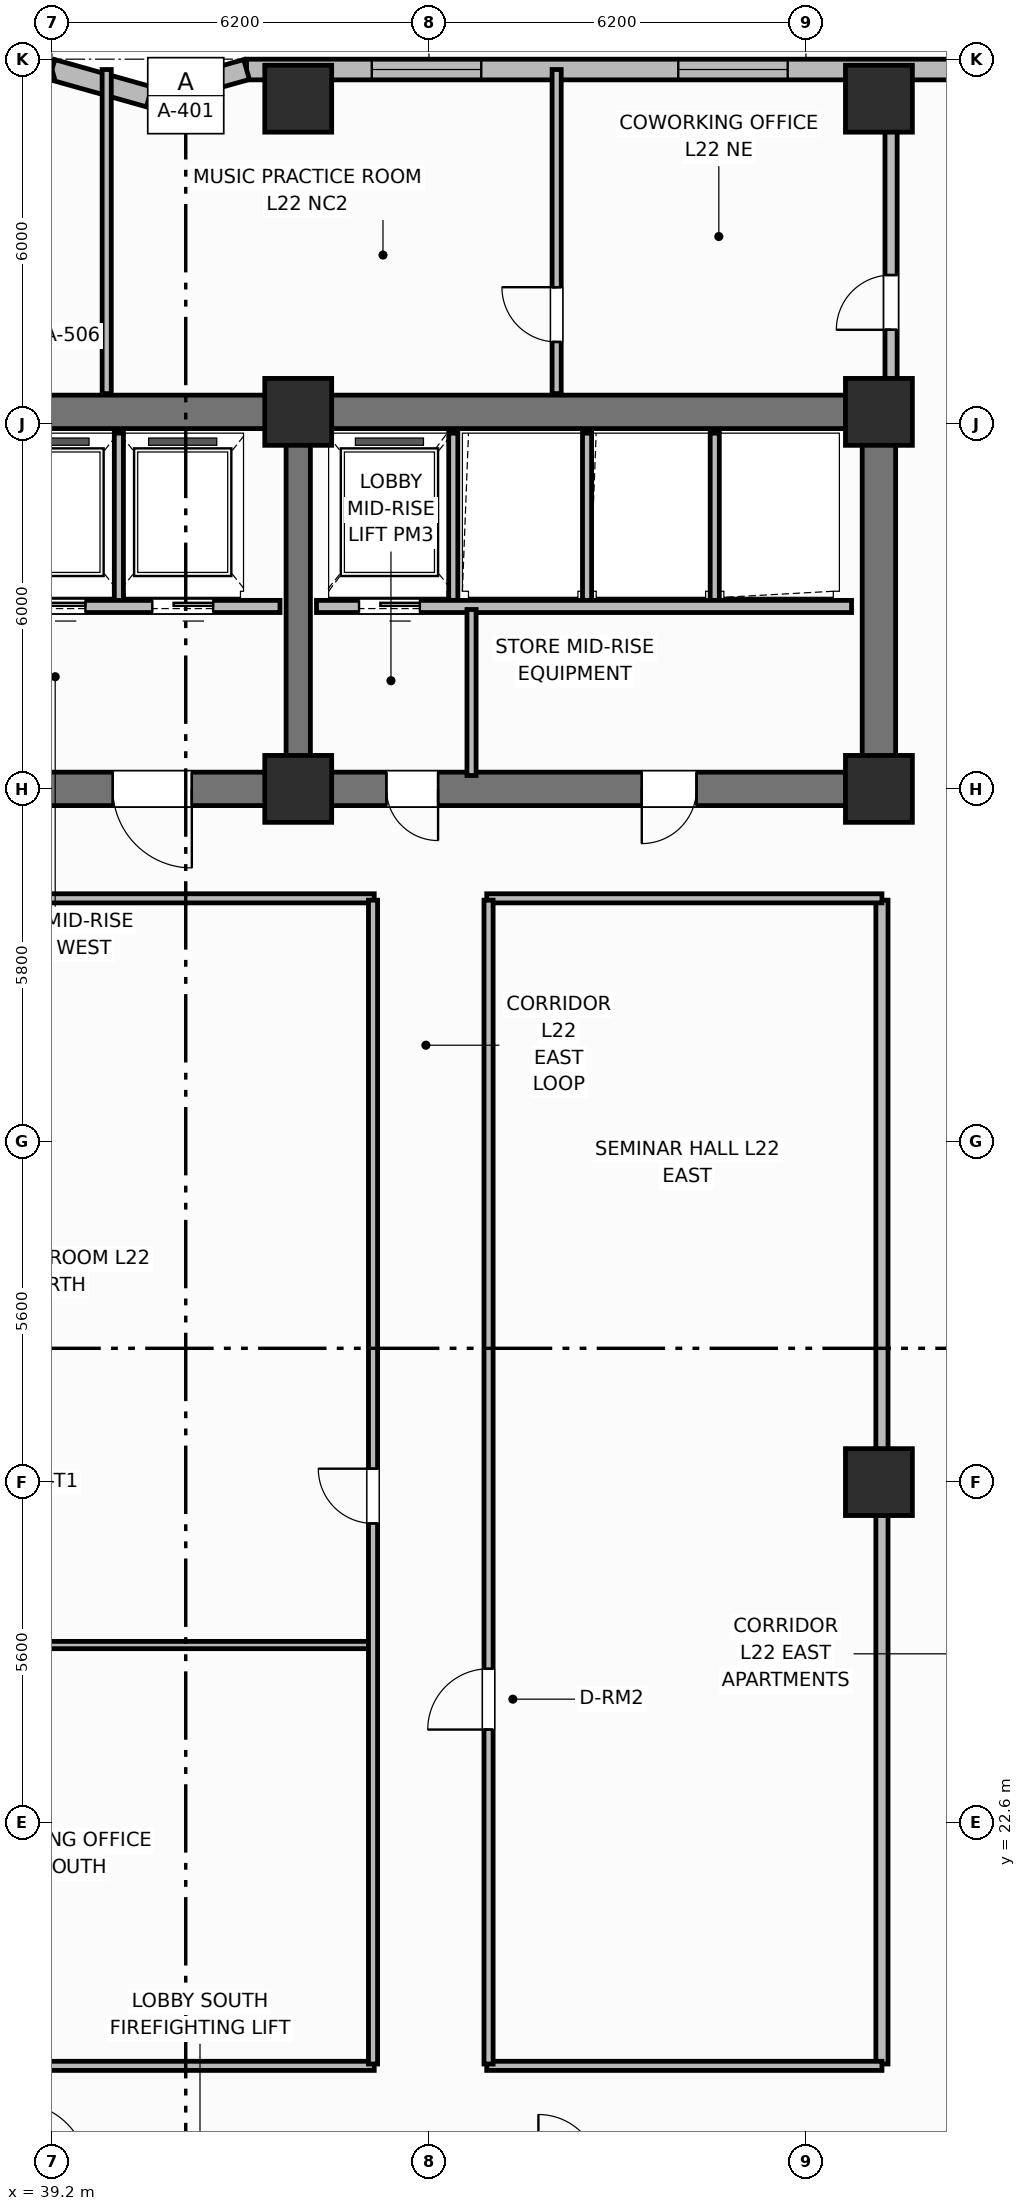
"""IFC4 building model, lengths in metres.
Left out: names, types, materials, properties, quantities, classifications, styles, units other than length and angle.
Written with IfcOpenShell. Run it as: python <this file> out.ifc"""

import sys

from ifc_helpers import new_model, si_unit, direction, frame, frame_2d, origin, origin_2d, place, context, subcontext, project, spatial, rectangle, extrude, element, fill, save


model = new_model("IFC4")
c1 = context("Model", 3, precision=1e-05, world=origin(), true_north=direction((0.0, 1.0)))
c2 = subcontext(c1, "Body", "Model", "MODEL_VIEW")
j1 = project(units=[si_unit("LENGTHUNIT", "METRE"), si_unit("PLANEANGLEUNIT", "RADIAN")], contexts=[c1])
p1 = place(None, origin())
s1 = spatial("IfcSite", under=j1, at=p1, CompositionType="ELEMENT")
p2 = place(p1, origin())
s2 = spatial("IfcBuilding", under=s1, at=p2, CompositionType="ELEMENT")
p3 = place(p2, frame((0.0, 0.0, 92.0)))
s3 = spatial("IfcBuildingStorey", under=s2, at=p3, CompositionType="ELEMENT", Elevation=92.0)
p4 = place(p3, frame((25.6, 45.8, 0.0), z_axis=(0.0, 0.0, 1.0), x_axis=(1.0, 0.0, 0.0)))
e1 = element("IfcWall", 1, at=p4, inside=s3, PredefinedType="SHEAR", context=c2, shape_type="SweptSolid", body=[
    extrude(rectangle(XDim=27.2, YDim=0.55, at=frame_2d((13.6, 0.0))), origin(), (0.0, 0.0, 1.0), 3.7),
])
p5 = place(p3, frame((52.8, 39.875, 0.0), z_axis=(0.0, 0.0, 1.0), x_axis=(0.0, 1.0, 0.0)))
e2 = element("IfcWall", 2, at=p5, inside=s3, PredefinedType="SHEAR", context=c2, shape_type="SweptSolid", body=[
    extrude(rectangle(XDim=5.65, YDim=0.55, at=frame_2d((2.825, 0.0))), origin(), (0.0, 0.0, 1.0), 3.7),
])
p6 = place(p3, frame((52.8, 39.6, 0.0), z_axis=(0.0, 0.0, 1.0), x_axis=(-1.0, 0.0, 0.0)))
e3 = element("IfcWall", 3, at=p6, inside=s3, PredefinedType="SHEAR", context=c2, shape_type="SweptSolid", body=[
    extrude(rectangle(XDim=27.2, YDim=0.55, at=frame_2d((13.6, 0.0))), origin(), (0.0, 0.0, 1.0), 3.7),
])
p7 = place(p6, frame((24.2, 0.0, 0.0)))
e4 = element("IfcOpeningElement", 4, at=p7, cuts=e3, PredefinedType="OPENING", context=c2, shape_type="SweptSolid", body=[
    extrude(rectangle(XDim=1.1, YDim=2.15, at=frame_2d((0.55, 1.075))), frame((0.0, 0.285, 0.0), z_axis=(0.0, -1.0, 0.0), x_axis=(1.0, 0.0, 0.0)), (0.0, 0.0, 1.0), 0.57),
])
p8 = place(p6, frame((15.1, 0.0, 0.0)))
e5 = element("IfcOpeningElement", 5, at=p8, cuts=e3, PredefinedType="OPENING", context=c2, shape_type="SweptSolid", body=[
    extrude(rectangle(XDim=1.2, YDim=2.15, at=frame_2d((0.6, 1.075))), frame((0.0, 0.285, 0.0), z_axis=(0.0, -1.0, 0.0), x_axis=(1.0, 0.0, 0.0)), (0.0, 0.0, 1.0), 0.57),
])
p9 = place(p6, frame((11.3, 0.0, 0.0)))
e6 = element("IfcOpeningElement", 6, at=p9, cuts=e3, PredefinedType="OPENING", context=c2, shape_type="SweptSolid", body=[
    extrude(rectangle(XDim=1.3, YDim=2.2, at=frame_2d((0.65, 1.1))), frame((0.0, 0.285, 0.0), z_axis=(0.0, -1.0, 0.0), x_axis=(1.0, 0.0, 0.0)), (0.0, 0.0, 1.0), 0.57),
])
p10 = place(p6, frame((7.25, 0.0, 0.0)))
e7 = element("IfcOpeningElement", 7, at=p10, cuts=e3, PredefinedType="OPENING", context=c2, shape_type="SweptSolid", body=[
    extrude(rectangle(XDim=0.85, YDim=2.1, at=frame_2d((0.425, 1.05))), frame((0.0, 0.285, 0.0), z_axis=(0.0, -1.0, 0.0), x_axis=(1.0, 0.0, 0.0)), (0.0, 0.0, 1.0), 0.57),
])
p11 = place(p6, frame((3.0, 0.0, 0.0)))
e8 = element("IfcOpeningElement", 8, at=p11, cuts=e3, PredefinedType="OPENING", context=c2, shape_type="SweptSolid", body=[
    extrude(rectangle(XDim=0.9, YDim=2.1, at=frame_2d((0.45, 1.05))), frame((0.0, 0.285, 0.0), z_axis=(0.0, -1.0, 0.0), x_axis=(1.0, 0.0, 0.0)), (0.0, 0.0, 1.0), 0.57),
])
p12 = place(p3, frame((43.25, 39.875, 0.0), z_axis=(0.0, 0.0, 1.0), x_axis=(0.0, 1.0, 0.0)))
e9 = element("IfcWall", 9, at=p12, inside=s3, PredefinedType="SHEAR", context=c2, shape_type="SweptSolid", body=[
    extrude(rectangle(XDim=5.65, YDim=0.4, at=frame_2d((2.825, 0.0))), origin(), (0.0, 0.0, 1.0), 3.7),
])
for number, where, z_axis, x_axis in (
    (10, (43.25, 39.6, 0.0), (0.0, 0.0, 1.0), (1.0, 0.0, 0.0)),
    (11, (43.25, 45.8, 0.0), (0.0, 0.0, 1.0), (1.0, 0.0, 0.0)),
    (12, (52.8, 39.6, 0.0), (0.0, 0.0, 1.0), (1.0, 0.0, 0.0)),
    (13, (52.8, 45.8, 0.0), (0.0, 0.0, 1.0), (1.0, 0.0, 0.0)),
    (14, (52.8, 28.2, 0.0), (0.0, 0.0, 1.0), (1.0, 0.0, 0.0)),
    (15, (43.25, 50.95, 0.0), (0.0, 0.0, 1.0), (1.0, 0.0, 0.0)),
    (16, (52.8, 50.95, 0.0), (0.0, 0.0, 1.0), (1.0, 0.0, 0.0)),
):
    element("IfcColumn", number, at=place(p3, frame(where, z_axis=z_axis, x_axis=x_axis)), inside=s3, PredefinedType="COLUMN", context=c2, shape_type="SweptSolid", body=[
        extrude(rectangle(XDim=1.1, YDim=1.1, at=origin_2d()), origin(), (0.0, 0.0, 1.0), 3.7),
    ])
p13 = place(p3, frame((59.8, 51.43, 0.0), z_axis=(0.0, 0.0, 1.0), x_axis=(-1.0, 0.0, 0.0)))
e17 = element("IfcWall", 17, at=p13, inside=s3, PredefinedType="SOLIDWALL", context=c2, shape_type="SweptSolid", body=[
    extrude(rectangle(XDim=17.4, YDim=0.34, at=frame_2d((8.7, 0.0))), origin(), (0.0, 0.0, 1.0), 2.7),
])
p14 = place(p13, frame((1.36, 0.0, 0.73)))
e18 = element("IfcOpeningElement", 18, at=p14, cuts=e17, PredefinedType="OPENING", context=c2, shape_type="SweptSolid", body=[
    extrude(rectangle(XDim=1.8, YDim=1.85, at=frame_2d((0.9, 0.925))), frame((0.0, 0.18, 0.0), z_axis=(0.0, -1.0, 0.0), x_axis=(1.0, 0.0, 0.0)), (0.0, 0.0, 1.0), 0.36),
])
p15 = place(p13, frame((8.5, 0.0, 0.73)))
e19 = element("IfcOpeningElement", 19, at=p15, cuts=e17, PredefinedType="OPENING", context=c2, shape_type="SweptSolid", body=[
    extrude(rectangle(XDim=1.8, YDim=1.85, at=frame_2d((0.9, 0.925))), frame((0.0, 0.18, 0.0), z_axis=(0.0, -1.0, 0.0), x_axis=(1.0, 0.0, 0.0)), (0.0, 0.0, 1.0), 0.36),
])
p16 = place(p13, frame((13.54, 0.0, 0.73)))
e20 = element("IfcOpeningElement", 20, at=p16, cuts=e17, PredefinedType="OPENING", context=c2, shape_type="SweptSolid", body=[
    extrude(rectangle(XDim=1.8, YDim=1.85, at=frame_2d((0.9, 0.925))), frame((0.0, 0.18, 0.0), z_axis=(0.0, -1.0, 0.0), x_axis=(1.0, 0.0, 0.0)), (0.0, 0.0, 1.0), 0.36),
])
p17 = place(p3, frame((42.4, 51.43, 0.0), z_axis=(0.0, 0.0, 1.0), x_axis=(-0.962652136636, -0.270741322725, 0.0)))
e21 = element("IfcWall", 21, at=p17, inside=s3, PredefinedType="SOLIDWALL", context=c2, shape_type="SweptSolid", body=[
    extrude(rectangle(XDim=1.662, YDim=0.34, at=frame_2d((0.831, 0.0))), origin(), (0.0, 0.0, 1.0), 2.7),
])
p18 = place(p3, frame((40.8, 50.98, 0.0), z_axis=(0.0, 0.0, 1.0), x_axis=(-0.962662902433, 0.270703040766, 0.0)))
e22 = element("IfcWall", 22, at=p18, inside=s3, PredefinedType="SOLIDWALL", context=c2, shape_type="SweptSolid", body=[
    extrude(rectangle(XDim=1.662, YDim=0.34, at=frame_2d((0.831, 0.0))), origin(), (0.0, 0.0, 1.0), 2.7),
])
p19 = place(p3, frame((39.2, 51.43, 0.0), z_axis=(0.0, 0.0, 1.0), x_axis=(-0.962652136636, -0.270741322725, 0.0)))
e23 = element("IfcWall", 23, at=p19, inside=s3, PredefinedType="SOLIDWALL", context=c2, shape_type="SweptSolid", body=[
    extrude(rectangle(XDim=1.662, YDim=0.34, at=frame_2d((0.831, 0.0))), origin(), (0.0, 0.0, 1.0), 2.7),
])
p20 = place(p3, frame((40.3, 42.65, 0.0), z_axis=(0.0, 0.0, 1.0), x_axis=(0.0, 1.0, 0.0)))
e24 = element("IfcWall", 24, at=p20, inside=s3, PredefinedType="PARTITIONING", context=c2, shape_type="SweptSolid", body=[
    extrude(rectangle(XDim=2.8, YDim=0.15, at=frame_2d((1.4, 0.0))), origin(), (0.0, 0.0, 1.0), 2.53),
])
p21 = place(p3, frame((42.95, 42.6, 0.0), z_axis=(0.0, 0.0, 1.0), x_axis=(-1.0, 0.0, 0.0)))
e25 = element("IfcWall", 25, at=p21, inside=s3, PredefinedType="PARTITIONING", context=c2, shape_type="SweptSolid", body=[
    extrude(rectangle(XDim=4.6, YDim=0.2, at=frame_2d((2.3, 0.0))), origin(), (0.0, 0.0, 1.0), 2.3),
])
p22 = place(p21, frame((3.2, 0.0, 0.0)))
e26 = element("IfcOpeningElement", 26, at=p22, cuts=e25, PredefinedType="OPENING", context=c2, shape_type="SweptSolid", body=[
    extrude(rectangle(XDim=1.0, YDim=2.15, at=frame_2d((0.5, 1.075))), frame((0.0, 0.11, 0.0), z_axis=(0.0, -1.0, 0.0), x_axis=(1.0, 0.0, 0.0)), (0.0, 0.0, 1.0), 0.22),
])
p23 = place(p21, frame((1.1, 0.0, 0.0)))
e27 = element("IfcOpeningElement", 27, at=p23, cuts=e25, PredefinedType="OPENING", context=c2, shape_type="SweptSolid", body=[
    extrude(rectangle(XDim=1.0, YDim=2.15, at=frame_2d((0.5, 1.075))), frame((0.0, 0.11, 0.0), z_axis=(0.0, -1.0, 0.0), x_axis=(1.0, 0.0, 0.0)), (0.0, 0.0, 1.0), 0.22),
])
for number, where, z_axis, x_axis in (
    (28, (45.8, 42.65, 0.0), (0.0, 0.0, 1.0), (0.0, 1.0, 0.0)),
    (29, (48.0, 42.65, 0.0), (0.0, 0.0, 1.0), (0.0, 1.0, 0.0)),
    (30, (50.1, 42.65, 0.0), (0.0, 0.0, 1.0), (0.0, 1.0, 0.0)),
):
    element("IfcWall", number, at=place(p3, frame(where, z_axis=z_axis, x_axis=x_axis)), inside=s3, PredefinedType="PARTITIONING", context=c2, shape_type="SweptSolid", body=[
        extrude(rectangle(XDim=2.8, YDim=0.15, at=frame_2d((1.4, 0.0))), origin(), (0.0, 0.0, 1.0), 2.53),
    ])
p24 = place(p3, frame((52.35, 42.6, 0.0), z_axis=(0.0, 0.0, 1.0), x_axis=(-1.0, 0.0, 0.0)))
e31 = element("IfcWall", 31, at=p24, inside=s3, PredefinedType="PARTITIONING", context=c2, shape_type="SweptSolid", body=[
    extrude(rectangle(XDim=8.8, YDim=0.2, at=frame_2d((4.4, 0.0))), origin(), (0.0, 0.0, 1.0), 2.53),
])
p25 = place(p24, frame((7.1, 0.0, 0.0)))
e32 = element("IfcOpeningElement", 32, at=p25, cuts=e31, PredefinedType="OPENING", context=c2, shape_type="SweptSolid", body=[
    extrude(rectangle(XDim=1.0, YDim=2.15, at=frame_2d((0.5, 1.075))), frame((0.0, 0.11, 0.0), z_axis=(0.0, -1.0, 0.0), x_axis=(1.0, 0.0, 0.0)), (0.0, 0.0, 1.0), 0.22),
])
p26 = place(p3, frame((46.1, 39.82, 0.0), z_axis=(0.0, 0.0, 1.0), x_axis=(0.0, 1.0, 0.0)))
e33 = element("IfcWall", 33, at=p26, inside=s3, PredefinedType="PARTITIONING", context=c2, shape_type="SweptSolid", body=[
    extrude(rectangle(XDim=2.73, YDim=0.15, at=frame_2d((1.365, 0.0))), origin(), (0.0, 0.0, 1.0), 2.53),
])
p27 = place(p3, frame((52.85, 18.63, 0.0), z_axis=(0.0, 0.0, 1.0), x_axis=(0.0, 1.0, 0.0)))
e34 = element("IfcWall", 34, at=p27, inside=s3, PredefinedType="PARTITIONING", context=c2, shape_type="SweptSolid", body=[
    extrude(rectangle(XDim=19.14, YDim=0.2, at=frame_2d((9.57, 0.0))), origin(), (0.0, 0.0, 1.0), 2.53),
])
for number, where, z_axis, x_axis in (
    (35, (33.9, 18.6, 0.0), (0.0, 0.0, 1.0), (1.0, 0.0, 0.0)),
    (36, (33.9, 37.8, 0.0), (0.0, 0.0, 1.0), (1.0, 0.0, 0.0)),
):
    element("IfcWall", number, at=place(p3, frame(where, z_axis=z_axis, x_axis=x_axis)), inside=s3, PredefinedType="PARTITIONING", context=c2, shape_type="SweptSolid", body=[
        extrude(rectangle(XDim=10.6, YDim=0.15, at=frame_2d((5.3, 0.0))), origin(), (0.0, 0.0, 1.0), 2.53),
    ])
for number, where, z_axis, x_axis in (
    (37, (46.35, 18.6, 0.0), (0.0, 0.0, 1.0), (1.0, 0.0, 0.0)),
    (38, (46.35, 37.8, 0.0), (0.0, 0.0, 1.0), (1.0, 0.0, 0.0)),
):
    element("IfcWall", number, at=place(p3, frame(where, z_axis=z_axis, x_axis=x_axis)), inside=s3, PredefinedType="PARTITIONING", context=c2, shape_type="SweptSolid", body=[
        extrude(rectangle(XDim=6.5, YDim=0.15, at=frame_2d((3.25, 0.0))), origin(), (0.0, 0.0, 1.0), 2.53),
    ])
p28 = place(p3, frame((33.92, 25.521, 0.0), z_axis=(0.0, 0.0, 1.0), x_axis=(1.0, 0.0, 0.0)))
e39 = element("IfcWall", 39, at=p28, inside=s3, PredefinedType="PARTITIONING", context=c2, shape_type="SweptSolid", body=[
    extrude(rectangle(XDim=10.56, YDim=0.12, at=frame_2d((5.28, 0.0))), origin(), (0.0, 0.0, 1.0), 2.53),
])
p29 = place(p3, frame((44.48, 18.63, 0.0), z_axis=(0.0, 0.0, 1.0), x_axis=(0.0, 1.0, 0.0)))
e40 = element("IfcWall", 40, at=p29, inside=s3, PredefinedType="PARTITIONING", context=c2, shape_type="SweptSolid", body=[
    extrude(rectangle(XDim=19.14, YDim=0.15, at=frame_2d((9.57, 0.0))), origin(), (0.0, 0.0, 1.0), 2.53),
])
p30 = place(p29, frame((8.89, 0.0, 0.0)))
e41 = element("IfcOpeningElement", 41, at=p30, cuts=e40, PredefinedType="OPENING", context=c2, shape_type="SweptSolid", body=[
    extrude(rectangle(XDim=0.9, YDim=2.1, at=frame_2d((0.45, 1.05))), frame((0.0, 0.085, 0.0), z_axis=(0.0, -1.0, 0.0), x_axis=(1.0, 0.0, 0.0)), (0.0, 0.0, 1.0), 0.17),
])
p31 = place(p3, frame((46.38, 18.63, 0.0), z_axis=(0.0, 0.0, 1.0), x_axis=(0.0, 1.0, 0.0)))
e42 = element("IfcWall", 42, at=p31, inside=s3, PredefinedType="PARTITIONING", context=c2, shape_type="SweptSolid", body=[
    extrude(rectangle(XDim=19.14, YDim=0.15, at=frame_2d((9.57, 0.0))), origin(), (0.0, 0.0, 1.0), 2.53),
])
p32 = place(p31, frame((5.5, 0.0, 0.0)))
e43 = element("IfcOpeningElement", 43, at=p32, cuts=e42, PredefinedType="OPENING", context=c2, shape_type="SweptSolid", body=[
    extrude(rectangle(XDim=1.0, YDim=2.15, at=frame_2d((0.5, 1.075))), frame((0.0, 0.085, 0.0), z_axis=(0.0, -1.0, 0.0), x_axis=(1.0, 0.0, 0.0)), (0.0, 0.0, 1.0), 0.17),
])
p33 = place(p3, frame((40.1, 46.1, 0.0), z_axis=(0.0, 0.0, 1.0), x_axis=(0.0, 1.0, 0.0)))
e44 = element("IfcWall", 44, at=p33, inside=s3, PredefinedType="PARTITIONING", context=c2, shape_type="SweptSolid", body=[
    extrude(rectangle(XDim=5.33, YDim=0.15, at=frame_2d((2.665, 0.0))), origin(), (0.0, 0.0, 1.0), 2.53),
])
p34 = place(p3, frame((47.5, 46.1, 0.0), z_axis=(0.0, 0.0, 1.0), x_axis=(0.0, 1.0, 0.0)))
e45 = element("IfcWall", 45, at=p34, inside=s3, PredefinedType="PARTITIONING", context=c2, shape_type="SweptSolid", body=[
    extrude(rectangle(XDim=5.33, YDim=0.15, at=frame_2d((2.665, 0.0))), origin(), (0.0, 0.0, 1.0), 2.53),
])
p35 = place(p34, frame((0.85, 0.0, 0.0)))
e46 = element("IfcOpeningElement", 46, at=p35, cuts=e45, PredefinedType="OPENING", context=c2, shape_type="SweptSolid", body=[
    extrude(rectangle(XDim=0.9, YDim=2.1, at=frame_2d((0.45, 1.05))), frame((0.0, 0.085, 0.0), z_axis=(0.0, -1.0, 0.0), x_axis=(1.0, 0.0, 0.0)), (0.0, 0.0, 1.0), 0.17),
])
p36 = place(p3, frame((53.0, 46.1, 0.0), z_axis=(0.0, 0.0, 1.0), x_axis=(0.0, 1.0, 0.0)))
e47 = element("IfcWall", 47, at=p36, inside=s3, PredefinedType="PARTITIONING", context=c2, shape_type="SweptSolid", body=[
    extrude(rectangle(XDim=4.68, YDim=0.2, at=frame_2d((2.34, 0.0))), origin(), (0.0, 0.0, 1.0), 2.53),
])
p37 = place(p36, frame((1.05, 0.0, 0.0)))
e48 = element("IfcOpeningElement", 48, at=p37, cuts=e47, PredefinedType="OPENING", context=c2, shape_type="SweptSolid", body=[
    extrude(rectangle(XDim=0.9, YDim=2.1, at=frame_2d((0.45, 1.05))), frame((0.0, 0.11, 0.0), z_axis=(0.0, -1.0, 0.0), x_axis=(1.0, 0.0, 0.0)), (0.0, 0.0, 1.0), 0.22),
])
p38 = place(p15, origin())
e49 = element("IfcWindow", 49, at=p38, inside=s3, PartitioningType="SINGLE_PANEL", PredefinedType="WINDOW", context=c2, shape_type="SweptSolid", body=[
    extrude(rectangle(XDim=1.8, YDim=1.85, at=frame_2d((0.9, 0.925))), frame((0.0, 0.03, 0.0), z_axis=(0.0, -1.0, 0.0), x_axis=(1.0, 0.0, 0.0)), (0.0, 0.0, 1.0), 0.06),
])
fill(e19, e49)
p39 = place(p16, origin())
e50 = element("IfcWindow", 50, at=p39, inside=s3, PartitioningType="SINGLE_PANEL", PredefinedType="WINDOW", context=c2, shape_type="SweptSolid", body=[
    extrude(rectangle(XDim=1.8, YDim=1.85, at=frame_2d((0.9, 0.925))), frame((0.0, 0.03, 0.0), z_axis=(0.0, -1.0, 0.0), x_axis=(1.0, 0.0, 0.0)), (0.0, 0.0, 1.0), 0.06),
])
fill(e20, e50)
p40 = place(p22, origin())
e51 = element("IfcDoor", 51, at=p40, inside=s3, OperationType="SLIDING_TO_LEFT", PredefinedType="DOOR", context=c2, shape_type="SweptSolid", body=[
    extrude(rectangle(XDim=1.0, YDim=2.15, at=frame_2d((0.5, 1.075))), frame((0.0, 0.025, 0.0), z_axis=(0.0, -1.0, 0.0), x_axis=(1.0, 0.0, 0.0)), (0.0, 0.0, 1.0), 0.05),
])
fill(e26, e51)
p41 = place(p23, origin())
e52 = element("IfcDoor", 52, at=p41, inside=s3, OperationType="SLIDING_TO_LEFT", PredefinedType="DOOR", context=c2, shape_type="SweptSolid", body=[
    extrude(rectangle(XDim=1.0, YDim=2.15, at=frame_2d((0.5, 1.075))), frame((0.0, 0.025, 0.0), z_axis=(0.0, -1.0, 0.0), x_axis=(1.0, 0.0, 0.0)), (0.0, 0.0, 1.0), 0.05),
])
fill(e27, e52)
p42 = place(p25, origin())
e53 = element("IfcDoor", 53, at=p42, inside=s3, OperationType="SLIDING_TO_LEFT", PredefinedType="DOOR", context=c2, shape_type="SweptSolid", body=[
    extrude(rectangle(XDim=1.0, YDim=2.15, at=frame_2d((0.5, 1.075))), frame((0.0, 0.025, 0.0), z_axis=(0.0, -1.0, 0.0), x_axis=(1.0, 0.0, 0.0)), (0.0, 0.0, 1.0), 0.05),
])
fill(e32, e53)
p43 = place(p30, origin())
e54 = element("IfcDoor", 54, at=p43, inside=s3, OperationType="SINGLE_SWING_RIGHT", PredefinedType="DOOR", context=c2, shape_type="SweptSolid", body=[
    extrude(rectangle(XDim=0.9, YDim=2.1, at=frame_2d((0.45, 1.05))), frame((0.0, 0.025, 0.0), z_axis=(0.0, -1.0, 0.0), x_axis=(1.0, 0.0, 0.0)), (0.0, 0.0, 1.0), 0.05),
])
fill(e41, e54)
p44 = place(p32, origin())
e55 = element("IfcDoor", 55, at=p44, inside=s3, OperationType="SINGLE_SWING_LEFT", PredefinedType="DOOR", context=c2, shape_type="SweptSolid", body=[
    extrude(rectangle(XDim=1.0, YDim=2.15, at=frame_2d((0.5, 1.075))), frame((0.0, 0.025, 0.0), z_axis=(0.0, -1.0, 0.0), x_axis=(1.0, 0.0, 0.0)), (0.0, 0.0, 1.0), 0.05),
])
fill(e43, e55)
p45 = place(p35, origin())
e56 = element("IfcDoor", 56, at=p45, inside=s3, OperationType="SINGLE_SWING_RIGHT", PredefinedType="DOOR", context=c2, shape_type="SweptSolid", body=[
    extrude(rectangle(XDim=0.9, YDim=2.1, at=frame_2d((0.45, 1.05))), frame((0.0, 0.025, 0.0), z_axis=(0.0, -1.0, 0.0), x_axis=(1.0, 0.0, 0.0)), (0.0, 0.0, 1.0), 0.05),
])
fill(e46, e56)
p46 = place(p37, origin())
e57 = element("IfcDoor", 57, at=p46, inside=s3, OperationType="SINGLE_SWING_LEFT", PredefinedType="DOOR", context=c2, shape_type="SweptSolid", body=[
    extrude(rectangle(XDim=0.9, YDim=2.1, at=frame_2d((0.45, 1.05))), frame((0.0, 0.025, 0.0), z_axis=(0.0, -1.0, 0.0), x_axis=(1.0, 0.0, 0.0)), (0.0, 0.0, 1.0), 0.05),
])
fill(e48, e57)
p47 = place(p9, origin())
e58 = element("IfcDoor", 58, at=p47, inside=s3, OperationType="SINGLE_SWING_LEFT", PredefinedType="DOOR", context=c2, shape_type="SweptSolid", body=[
    extrude(rectangle(XDim=1.3, YDim=2.2, at=frame_2d((0.65, 1.1))), frame((0.0, 0.025, 0.0), z_axis=(0.0, -1.0, 0.0), x_axis=(1.0, 0.0, 0.0)), (0.0, 0.0, 1.0), 0.05),
])
fill(e6, e58)
p48 = place(p10, origin())
e59 = element("IfcDoor", 59, at=p48, inside=s3, OperationType="SINGLE_SWING_LEFT", PredefinedType="DOOR", context=c2, shape_type="SweptSolid", body=[
    extrude(rectangle(XDim=0.85, YDim=2.1, at=frame_2d((0.425, 1.05))), frame((0.0, 0.025, 0.0), z_axis=(0.0, -1.0, 0.0), x_axis=(1.0, 0.0, 0.0)), (0.0, 0.0, 1.0), 0.05),
])
fill(e7, e59)
p49 = place(p11, origin())
e60 = element("IfcDoor", 60, at=p49, inside=s3, OperationType="SINGLE_SWING_RIGHT", PredefinedType="DOOR", context=c2, shape_type="SweptSolid", body=[
    extrude(rectangle(XDim=0.9, YDim=2.1, at=frame_2d((0.45, 1.05))), frame((0.0, 0.025, 0.0), z_axis=(0.0, -1.0, 0.0), x_axis=(1.0, 0.0, 0.0)), (0.0, 0.0, 1.0), 0.05),
])
fill(e8, e60)
save(model, sys.argv[1])
